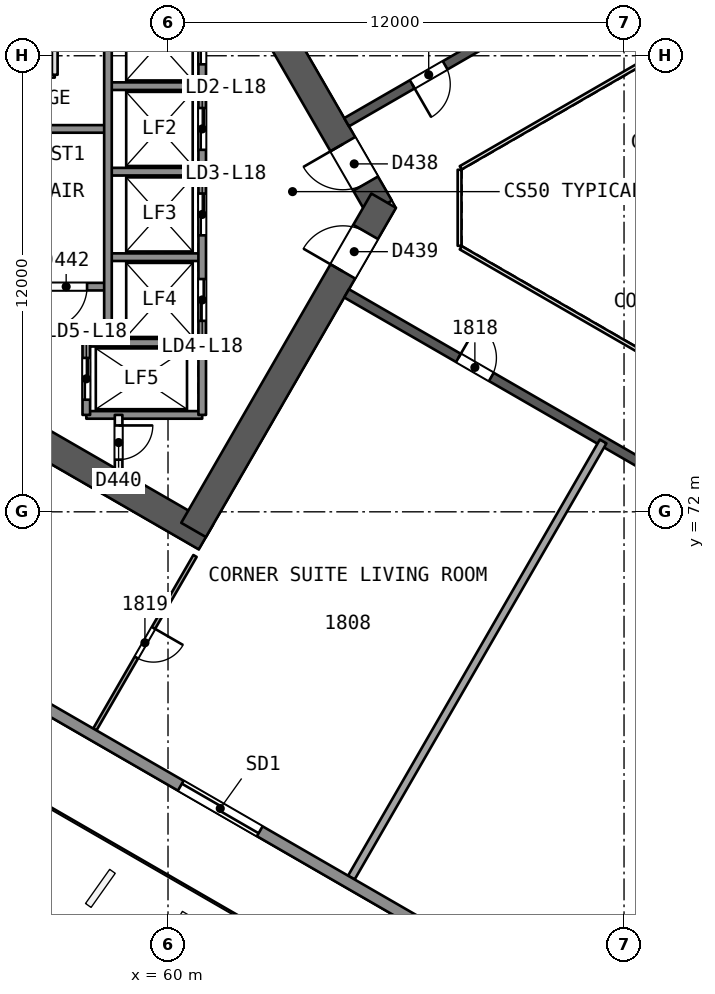
"""IFC4 building model, lengths in metres.
Left out: names, types, materials, properties, quantities, classifications, styles, units other than length and angle.
Written with IfcOpenShell. Run it as: python <this file> out.ifc"""

import sys

from ifc_helpers import new_model, si_unit, direction, frame, frame_2d, origin, place, context, subcontext, project, spatial, rectangle, extrude, element, fill, save


model = new_model("IFC4")
c1 = context("Model", 3, precision=1e-05, world=origin(), true_north=direction((0.0, 1.0)))
c2 = subcontext(c1, "Body", "Model", "MODEL_VIEW")
j1 = project(units=[si_unit("LENGTHUNIT", "METRE"), si_unit("PLANEANGLEUNIT", "RADIAN")], contexts=[c1])
p1 = place(None, origin())
s1 = spatial("IfcSite", under=j1, at=p1, CompositionType="ELEMENT")
p2 = place(p1, origin())
s2 = spatial("IfcBuilding", under=s1, at=p2, CompositionType="ELEMENT")
p3 = place(p2, frame((0.0, 0.0, 79.5)))
s3 = spatial("IfcBuildingStorey", under=s2, at=p3, CompositionType="ELEMENT", Elevation=79.5)
p4 = place(p3, frame((65.567, 80.0, 0.0), z_axis=(0.0, 0.0, 1.0), x_axis=(-0.499988615364, 0.866031976607, 0.0)))
e1 = element("IfcWall", 1, at=p4, inside=s3, PredefinedType="SHEAR", context=c2, shape_type="SweptSolid", body=[
    extrude(rectangle(XDim=10.163, YDim=0.75, at=frame_2d((5.082, 0.0))), origin(), (0.0, 0.0, 1.0), 3.7),
])
p5 = place(p4, frame((0.733, 0.0, 0.0)))
e2 = element("IfcOpeningElement", 2, at=p5, cuts=e1, PredefinedType="OPENING", context=c2, shape_type="SweptSolid", body=[
    extrude(rectangle(XDim=1.2, YDim=2.1, at=frame_2d((0.6, 1.05))), frame((0.0, 0.385, 0.0), z_axis=(0.0, -1.0, 0.0), x_axis=(1.0, 0.0, 0.0)), (0.0, 0.0, 1.0), 0.771),
])
p6 = place(p3, frame((60.673, 88.477, 0.0), z_axis=(0.0, 0.0, 1.0), x_axis=(-0.8660248072, -0.500001033313, 0.0)))
e3 = element("IfcWall", 3, at=p6, inside=s3, PredefinedType="SHEAR", context=c2, shape_type="SweptSolid", body=[
    extrude(rectangle(XDim=13.958, YDim=0.75, at=frame_2d((6.979, 0.0))), origin(), (0.0, 0.0, 1.0), 3.7),
])
p7 = place(p3, frame((48.772, 78.394, 0.0), z_axis=(0.0, 0.0, 1.0), x_axis=(0.866028339916, -0.499994914436, 0.0)))
e4 = element("IfcWall", 4, at=p7, inside=s3, PredefinedType="SHEAR", context=c2, shape_type="SweptSolid", body=[
    extrude(rectangle(XDim=14.117, YDim=0.75, at=frame_2d((7.059, 0.0))), origin(), (0.0, 0.0, 1.0), 3.7),
])
p8 = place(p3, frame((60.673, 71.523, 0.0), z_axis=(0.0, 0.0, 1.0), x_axis=(0.499997052475, 0.866027105532, 0.0)))
e5 = element("IfcWall", 5, at=p8, inside=s3, PredefinedType="SHEAR", context=c2, shape_type="SweptSolid", body=[
    extrude(rectangle(XDim=10.005, YDim=0.75, at=frame_2d((5.002, 0.0))), origin(), (0.0, 0.0, 1.0), 3.7),
])
p9 = place(p8, frame((7.855, 0.0, 0.0)))
e6 = element("IfcOpeningElement", 6, at=p9, cuts=e5, PredefinedType="OPENING", context=c2, shape_type="SweptSolid", body=[
    extrude(rectangle(XDim=1.2, YDim=2.1, at=frame_2d((0.6, 1.05))), frame((0.0, 0.385, 0.0), z_axis=(0.0, -1.0, 0.0), x_axis=(1.0, 0.0, 0.0)), (0.0, 0.0, 1.0), 0.771),
])
p10 = place(p3, frame((78.2, 90.046, 0.0), z_axis=(0.0, 0.0, 1.0), x_axis=(-0.866026492143, -0.499998114903, 0.0)))
e7 = element("IfcWall", 7, at=p10, inside=s3, PredefinedType="SHEAR", context=c2, shape_type="SweptSolid", body=[
    extrude(rectangle(XDim=15.588, YDim=0.25, at=frame_2d((7.794, 0.0))), origin(), (0.0, 0.0, 1.0), 3.2),
])
p11 = place(p10, frame((1.527, 0.0, 0.0)))
e8 = element("IfcOpeningElement", 8, at=p11, cuts=e7, PredefinedType="OPENING", context=c2, shape_type="SweptSolid", body=[
    extrude(rectangle(XDim=1.0, YDim=2.1, at=frame_2d((0.5, 1.05))), frame((0.0, 0.135, 0.0), z_axis=(0.0, -1.0, 0.0), x_axis=(1.0, 0.0, 0.0)), (0.0, 0.0, 1.0), 0.271),
])
p12 = place(p10, frame((8.227, 0.0, 0.0)))
e9 = element("IfcOpeningElement", 9, at=p12, cuts=e7, PredefinedType="OPENING", context=c2, shape_type="SweptSolid", body=[
    extrude(rectangle(XDim=1.1, YDim=2.1, at=frame_2d((0.55, 1.05))), frame((0.0, 0.135, 0.0), z_axis=(0.0, -1.0, 0.0), x_axis=(1.0, 0.0, 0.0)), (0.0, 0.0, 1.0), 0.271),
])
p13 = place(p10, frame((12.594, 0.0, 0.0)))
e10 = element("IfcOpeningElement", 10, at=p13, cuts=e7, PredefinedType="OPENING", context=c2, shape_type="SweptSolid", body=[
    extrude(rectangle(XDim=1.0, YDim=2.1, at=frame_2d((0.5, 1.05))), frame((0.0, 0.135, 0.0), z_axis=(0.0, -1.0, 0.0), x_axis=(1.0, 0.0, 0.0)), (0.0, 0.0, 1.0), 0.271),
])
p14 = place(p3, frame((64.7, 77.748, 0.0), z_axis=(0.0, 0.0, 1.0), x_axis=(0.866026492143, -0.499998114903, 0.0)))
e11 = element("IfcWall", 11, at=p14, inside=s3, PredefinedType="SHEAR", context=c2, shape_type="SweptSolid", body=[
    extrude(rectangle(XDim=15.588, YDim=0.25, at=frame_2d((7.794, 0.0))), origin(), (0.0, 0.0, 1.0), 3.2),
])
p15 = place(p14, frame((3.397, 0.0, 0.0)))
e12 = element("IfcOpeningElement", 12, at=p15, cuts=e11, PredefinedType="OPENING", context=c2, shape_type="SweptSolid", body=[
    extrude(rectangle(XDim=1.0, YDim=2.1, at=frame_2d((0.5, 1.05))), frame((0.0, 0.135, 0.0), z_axis=(0.0, -1.0, 0.0), x_axis=(1.0, 0.0, 0.0)), (0.0, 0.0, 1.0), 0.271),
])
p16 = place(p14, frame((9.091, 0.0, 0.0)))
e13 = element("IfcOpeningElement", 13, at=p16, cuts=e11, PredefinedType="OPENING", context=c2, shape_type="SweptSolid", body=[
    extrude(rectangle(XDim=1.0, YDim=2.1, at=frame_2d((0.5, 1.05))), frame((0.0, 0.135, 0.0), z_axis=(0.0, -1.0, 0.0), x_axis=(1.0, 0.0, 0.0)), (0.0, 0.0, 1.0), 0.271),
])
p17 = place(p3, frame((60.71, 70.838, 0.0), z_axis=(0.0, 0.0, 1.0), x_axis=(-0.499973627007, -0.866040629704, 0.0)))
e14 = element("IfcWall", 14, at=p17, inside=s3, PredefinedType="PARTITIONING", context=c2, shape_type="SweptSolid", body=[
    extrude(rectangle(XDim=5.273, YDim=0.1, at=frame_2d((2.636, 0.0))), origin(), (0.0, 0.0, 1.0), 3.2),
])
p18 = place(p17, frame((2.186, 0.0, 0.0)))
e15 = element("IfcOpeningElement", 15, at=p18, cuts=e14, PredefinedType="OPENING", context=c2, shape_type="SweptSolid", body=[
    extrude(rectangle(XDim=0.9, YDim=2.1, at=frame_2d((0.45, 1.05))), frame((0.0, 0.061, 0.0), z_axis=(0.0, -1.0, 0.0), x_axis=(1.0, 0.0, 0.0)), (0.0, 0.0, 1.0), 0.121),
])
p19 = place(p3, frame((64.824, 62.375, 0.0), z_axis=(0.0, 0.0, 1.0), x_axis=(0.499993034499, 0.866029425281, 0.0)))
e16 = element("IfcWall", 16, at=p19, inside=s3, PredefinedType="PARTITIONING", context=c2, shape_type="SweptSolid", body=[
    extrude(rectangle(XDim=13.252, YDim=0.2, at=frame_2d((6.626, 0.0))), origin(), (0.0, 0.0, 1.0), 3.2),
])
p20 = place(p3, frame((39.223, 83.016, 0.0), z_axis=(0.0, 0.0, 1.0), x_axis=(0.86602468924, 0.500001237625, 0.0)))
e17 = element("IfcWall", 17, at=p20, inside=s3, PredefinedType="SOLIDWALL", context=c2, shape_type="SweptSolid", body=[
    extrude(rectangle(XDim=58.951, YDim=0.3, at=frame_2d((29.476, 0.0))), origin(), (0.0, 0.0, 1.0), 3.2),
])
p21 = place(p20, frame((28.743, 0.0, 0.0)))
e18 = element("IfcOpeningElement", 18, at=p21, cuts=e17, PredefinedType="OPENING", context=c2, shape_type="SweptSolid", body=[
    extrude(rectangle(XDim=2.4, YDim=2.4, at=frame_2d((1.2, 1.2))), frame((0.0, 0.161, 0.0), z_axis=(0.0, -1.0, 0.0), x_axis=(1.0, 0.0, 0.0)), (0.0, 0.0, 1.0), 0.321),
])
p22 = place(p20, frame((34.043, 0.0, 0.0)))
e19 = element("IfcOpeningElement", 19, at=p22, cuts=e17, PredefinedType="OPENING", context=c2, shape_type="SweptSolid", body=[
    extrude(rectangle(XDim=2.4, YDim=2.4, at=frame_2d((1.2, 1.2))), frame((0.0, 0.161, 0.0), z_axis=(0.0, -1.0, 0.0), x_axis=(1.0, 0.0, 0.0)), (0.0, 0.0, 1.0), 0.321),
])
p23 = place(p20, frame((45.739, 0.0, 0.0)))
e20 = element("IfcOpeningElement", 20, at=p23, cuts=e17, PredefinedType="OPENING", context=c2, shape_type="SweptSolid", body=[
    extrude(rectangle(XDim=2.4, YDim=2.4, at=frame_2d((1.2, 1.2))), frame((0.0, 0.161, 0.0), z_axis=(0.0, -1.0, 0.0), x_axis=(1.0, 0.0, 0.0)), (0.0, 0.0, 1.0), 0.321),
])
p24 = place(p20, frame((22.976, 0.0, 0.0)))
e21 = element("IfcOpeningElement", 21, at=p24, cuts=e17, PredefinedType="OPENING", context=c2, shape_type="SweptSolid", body=[
    extrude(rectangle(XDim=2.4, YDim=2.4, at=frame_2d((1.2, 1.2))), frame((0.0, 0.161, 0.0), z_axis=(0.0, -1.0, 0.0), x_axis=(1.0, 0.0, 0.0)), (0.0, 0.0, 1.0), 0.321),
])
p25 = place(p20, frame((10.773, 0.0, 0.0)))
e22 = element("IfcOpeningElement", 22, at=p25, cuts=e17, PredefinedType="OPENING", context=c2, shape_type="SweptSolid", body=[
    extrude(rectangle(XDim=2.4, YDim=2.4, at=frame_2d((1.2, 1.2))), frame((0.0, 0.161, 0.0), z_axis=(0.0, -1.0, 0.0), x_axis=(1.0, 0.0, 0.0)), (0.0, 0.0, 1.0), 0.321),
])
p26 = place(p3, frame((90.276, 47.508, 0.0), z_axis=(0.0, 0.0, 1.0), x_axis=(-0.86602468924, 0.500001237625, 0.0)))
e23 = element("IfcWall", 23, at=p26, inside=s3, PredefinedType="SOLIDWALL", context=c2, shape_type="SweptSolid", body=[
    extrude(rectangle(XDim=58.951, YDim=0.3, at=frame_2d((29.476, 0.0))), origin(), (0.0, 0.0, 1.0), 3.2),
])
p27 = place(p26, frame((32.173, 0.0, 0.0)))
e24 = element("IfcOpeningElement", 24, at=p27, cuts=e23, PredefinedType="OPENING", context=c2, shape_type="SweptSolid", body=[
    extrude(rectangle(XDim=2.4, YDim=2.4, at=frame_2d((1.2, 1.2))), frame((0.0, 0.161, 0.0), z_axis=(0.0, -1.0, 0.0), x_axis=(1.0, 0.0, 0.0)), (0.0, 0.0, 1.0), 0.321),
])
p28 = place(p26, frame((45.739, 0.0, 0.0)))
e25 = element("IfcOpeningElement", 25, at=p28, cuts=e23, PredefinedType="OPENING", context=c2, shape_type="SweptSolid", body=[
    extrude(rectangle(XDim=2.4, YDim=2.4, at=frame_2d((1.2, 1.2))), frame((0.0, 0.161, 0.0), z_axis=(0.0, -1.0, 0.0), x_axis=(1.0, 0.0, 0.0)), (0.0, 0.0, 1.0), 0.321),
])
p29 = place(p26, frame((13.495, 0.0, 0.0)))
e26 = element("IfcOpeningElement", 26, at=p29, cuts=e23, PredefinedType="OPENING", context=c2, shape_type="SweptSolid", body=[
    extrude(rectangle(XDim=2.4, YDim=2.4, at=frame_2d((1.2, 1.2))), frame((0.0, 0.161, 0.0), z_axis=(0.0, -1.0, 0.0), x_axis=(1.0, 0.0, 0.0)), (0.0, 0.0, 1.0), 0.321),
])
p30 = place(p3, frame((57.02, 83.5, 0.0), z_axis=(0.0, 0.0, 1.0), x_axis=(-1.0, 0.0, 0.0)))
e27 = element("IfcWall", 27, at=p30, inside=s3, PredefinedType="PARTITIONING", context=c2, shape_type="SweptSolid", body=[
    extrude(rectangle(XDim=4.218, YDim=0.15, at=frame_2d((2.109, 0.0))), origin(), (0.0, 0.0, 1.0), 3.2),
])
p31 = place(p30, frame((1.631, 0.0, 0.0)))
e28 = element("IfcOpeningElement", 28, at=p31, cuts=e27, PredefinedType="OPENING", context=c2, shape_type="SweptSolid", body=[
    extrude(rectangle(XDim=0.9, YDim=2.1, at=frame_2d((0.45, 1.05))), frame((0.0, 0.085, 0.0), z_axis=(0.0, -1.0, 0.0), x_axis=(1.0, 0.0, 0.0)), (0.0, 0.0, 1.0), 0.171),
])
p32 = place(p3, frame((60.9, 83.2, 0.0), z_axis=(0.0, 0.0, 1.0), x_axis=(-1.0, 0.0, 0.0)))
e29 = element("IfcWall", 29, at=p32, inside=s3, PredefinedType="SOLIDWALL", context=c2, shape_type="SweptSolid", body=[
    extrude(rectangle(XDim=2.48, YDim=0.2, at=frame_2d((1.24, 0.0))), origin(), (0.0, 0.0, 1.0), 3.2),
])
p33 = place(p3, frame((58.42, 82.075, 0.0), z_axis=(0.0, 0.0, 1.0), x_axis=(-1.0, 0.0, 0.0)))
e30 = element("IfcWall", 30, at=p33, inside=s3, PredefinedType="SOLIDWALL", context=c2, shape_type="SweptSolid", body=[
    extrude(rectangle(XDim=7.7, YDim=0.2, at=frame_2d((3.85, 0.0))), origin(), (0.0, 0.0, 1.0), 3.2),
])
for number, where, z_axis, x_axis in (
    (31, (60.9, 80.95, 0.0), (0.0, 0.0, 1.0), (-1.0, 0.0, 0.0)),
    (32, (60.9, 78.7, 0.0), (0.0, 0.0, 1.0), (-1.0, 0.0, 0.0)),
):
    element("IfcWall", number, at=place(p3, frame(where, z_axis=z_axis, x_axis=x_axis)), inside=s3, PredefinedType="SOLIDWALL", context=c2, shape_type="SweptSolid", body=[
        extrude(rectangle(XDim=2.48, YDim=0.2, at=frame_2d((1.24, 0.0))), origin(), (0.0, 0.0, 1.0), 3.2),
    ])
p34 = place(p3, frame((58.42, 77.925, 0.0), z_axis=(0.0, 0.0, 1.0), x_axis=(-1.0, 0.0, 0.0)))
e33 = element("IfcWall", 33, at=p34, inside=s3, PredefinedType="SOLIDWALL", context=c2, shape_type="SweptSolid", body=[
    extrude(rectangle(XDim=7.7, YDim=0.2, at=frame_2d((3.85, 0.0))), origin(), (0.0, 0.0, 1.0), 3.2),
])
p35 = place(p34, frame((0.55, 0.0, 0.0)))
e34 = element("IfcOpeningElement", 34, at=p35, cuts=e33, PredefinedType="OPENING", context=c2, shape_type="SweptSolid", body=[
    extrude(rectangle(XDim=1.1, YDim=2.1, at=frame_2d((0.55, 1.05))), frame((0.0, 0.11, 0.0), z_axis=(0.0, -1.0, 0.0), x_axis=(1.0, 0.0, 0.0)), (0.0, 0.0, 1.0), 0.221),
])
for number, where, z_axis, x_axis in (
    (35, (60.9, 76.45, 0.0), (0.0, 0.0, 1.0), (-1.0, 0.0, 0.0)),
    (36, (60.9, 74.55, 0.0), (0.0, 0.0, 1.0), (-1.0, 0.0, 0.0)),
):
    element("IfcWall", number, at=place(p3, frame(where, z_axis=z_axis, x_axis=x_axis)), inside=s3, PredefinedType="SOLIDWALL", context=c2, shape_type="SweptSolid", body=[
        extrude(rectangle(XDim=3.05, YDim=0.2, at=frame_2d((1.525, 0.0))), origin(), (0.0, 0.0, 1.0), 3.2),
    ])
p36 = place(p3, frame((60.9, 85.45, 0.0), z_axis=(0.0, 0.0, 1.0), x_axis=(0.0, -1.0, 0.0)))
e37 = element("IfcWall", 37, at=p36, inside=s3, PredefinedType="SOLIDWALL", context=c2, shape_type="SweptSolid", body=[
    extrude(rectangle(XDim=10.9, YDim=0.2, at=frame_2d((5.45, 0.0))), origin(), (0.0, 0.0, 1.0), 3.2),
])
p37 = place(p36, frame((0.575, 0.0, 0.0)))
e38 = element("IfcOpeningElement", 38, at=p37, cuts=e37, PredefinedType="OPENING", context=c2, shape_type="SweptSolid", body=[
    extrude(rectangle(XDim=1.1, YDim=2.1, at=frame_2d((0.55, 1.05))), frame((0.0, 0.11, 0.0), z_axis=(0.0, -1.0, 0.0), x_axis=(1.0, 0.0, 0.0)), (0.0, 0.0, 1.0), 0.221),
])
p38 = place(p36, frame((2.825, 0.0, 0.0)))
e39 = element("IfcOpeningElement", 39, at=p38, cuts=e37, PredefinedType="OPENING", context=c2, shape_type="SweptSolid", body=[
    extrude(rectangle(XDim=1.1, YDim=2.1, at=frame_2d((0.55, 1.05))), frame((0.0, 0.11, 0.0), z_axis=(0.0, -1.0, 0.0), x_axis=(1.0, 0.0, 0.0)), (0.0, 0.0, 1.0), 0.221),
])
p39 = place(p36, frame((5.075, 0.0, 0.0)))
e40 = element("IfcOpeningElement", 40, at=p39, cuts=e37, PredefinedType="OPENING", context=c2, shape_type="SweptSolid", body=[
    extrude(rectangle(XDim=1.1, YDim=2.1, at=frame_2d((0.55, 1.05))), frame((0.0, 0.11, 0.0), z_axis=(0.0, -1.0, 0.0), x_axis=(1.0, 0.0, 0.0)), (0.0, 0.0, 1.0), 0.221),
])
p40 = place(p36, frame((7.325, 0.0, 0.0)))
e41 = element("IfcOpeningElement", 41, at=p40, cuts=e37, PredefinedType="OPENING", context=c2, shape_type="SweptSolid", body=[
    extrude(rectangle(XDim=1.1, YDim=2.1, at=frame_2d((0.55, 1.05))), frame((0.0, 0.11, 0.0), z_axis=(0.0, -1.0, 0.0), x_axis=(1.0, 0.0, 0.0)), (0.0, 0.0, 1.0), 0.221),
])
p41 = place(p3, frame((58.7, 74.55, 0.0), z_axis=(0.0, 0.0, 1.0), x_axis=(0.0, -1.0, 0.0)))
e42 = element("IfcWall", 42, at=p41, inside=s3, PredefinedType="PARTITIONING", context=c2, shape_type="SweptSolid", body=[
    extrude(rectangle(XDim=1.455, YDim=0.2, at=frame_2d((0.728, 0.0))), origin(), (0.0, 0.0, 1.0), 3.2),
])
p42 = place(p41, frame((0.278, 0.0, 0.0)))
e43 = element("IfcOpeningElement", 43, at=p42, cuts=e42, PredefinedType="OPENING", context=c2, shape_type="SweptSolid", body=[
    extrude(rectangle(XDim=0.9, YDim=2.1, at=frame_2d((0.45, 1.05))), frame((0.0, 0.11, 0.0), z_axis=(0.0, -1.0, 0.0), x_axis=(1.0, 0.0, 0.0)), (0.0, 0.0, 1.0), 0.221),
])
p43 = place(p3, frame((58.42, 85.45, 0.0), z_axis=(0.0, 0.0, 1.0), x_axis=(0.0, -1.0, 0.0)))
e44 = element("IfcWall", 44, at=p43, inside=s3, PredefinedType="SOLIDWALL", context=c2, shape_type="SweptSolid", body=[
    extrude(rectangle(XDim=9.0, YDim=0.2, at=frame_2d((4.5, 0.0))), origin(), (0.0, 0.0, 1.0), 3.2),
])
p44 = place(p3, frame((57.85, 76.45, 0.0), z_axis=(0.0, 0.0, 1.0), x_axis=(0.0, -1.0, 0.0)))
e45 = element("IfcWall", 45, at=p44, inside=s3, PredefinedType="SOLIDWALL", context=c2, shape_type="SweptSolid", body=[
    extrude(rectangle(XDim=1.9, YDim=0.2, at=frame_2d((0.95, 0.0))), origin(), (0.0, 0.0, 1.0), 3.2),
])
p45 = place(p44, frame((0.4, 0.0, 0.0)))
e46 = element("IfcOpeningElement", 46, at=p45, cuts=e45, PredefinedType="OPENING", context=c2, shape_type="SweptSolid", body=[
    extrude(rectangle(XDim=1.1, YDim=2.1, at=frame_2d((0.55, 1.05))), frame((0.0, 0.11, 0.0), z_axis=(0.0, -1.0, 0.0), x_axis=(1.0, 0.0, 0.0)), (0.0, 0.0, 1.0), 0.221),
])
p46 = place(p3, frame((57.02, 85.935, 0.0), z_axis=(0.0, 0.0, 1.0), x_axis=(0.0, -1.0, 0.0)))
e47 = element("IfcWall", 47, at=p46, inside=s3, PredefinedType="PARTITIONING", context=c2, shape_type="SweptSolid", body=[
    extrude(rectangle(XDim=2.435, YDim=0.15, at=frame_2d((1.218, 0.0))), origin(), (0.0, 0.0, 1.0), 3.2),
])
p47 = place(p3, frame((77.738, 86.846, 0.0), z_axis=(0.0, 0.0, 1.0), x_axis=(-0.866026658274, -0.499997827154, 0.0)))
e48 = element("IfcWall", 48, at=p47, inside=s3, PredefinedType="PARTITIONING", context=c2, shape_type="SweptSolid", body=[
    extrude(rectangle(XDim=11.588, YDim=0.1, at=frame_2d((5.794, 0.0))), origin(), (0.0, 0.0, 1.0), 3.2),
])
p48 = place(p3, frame((67.672, 81.0, 0.0), z_axis=(0.0, 0.0, 1.0), x_axis=(0.0, -1.0, 0.0)))
e49 = element("IfcWall", 49, at=p48, inside=s3, PredefinedType="PARTITIONING", context=c2, shape_type="SweptSolid", body=[
    extrude(rectangle(XDim=2.0, YDim=0.1, at=frame_2d((1.0, 0.0))), origin(), (0.0, 0.0, 1.0), 3.2),
])
p49 = place(p3, frame((67.702, 78.948, 0.0), z_axis=(0.0, 0.0, 1.0), x_axis=(0.866026658274, -0.499997827154, 0.0)))
e50 = element("IfcWall", 50, at=p49, inside=s3, PredefinedType="PARTITIONING", context=c2, shape_type="SweptSolid", body=[
    extrude(rectangle(XDim=11.588, YDim=0.1, at=frame_2d((5.794, 0.0))), origin(), (0.0, 0.0, 1.0), 3.2),
])
p50 = place(p13, origin())
e51 = element("IfcDoor", 51, at=p50, inside=s3, OperationType="SINGLE_SWING_RIGHT", PredefinedType="NOTDEFINED", context=c2, shape_type="SweptSolid", body=[
    extrude(rectangle(XDim=1.0, YDim=2.1, at=frame_2d((0.5, 1.05))), frame((0.0, 0.025, 0.0), z_axis=(0.0, -1.0, 0.0), x_axis=(1.0, 0.0, 0.0)), (0.0, 0.0, 1.0), 0.05),
])
fill(e10, e51)
p51 = place(p15, origin())
e52 = element("IfcDoor", 52, at=p51, inside=s3, OperationType="SINGLE_SWING_LEFT", PredefinedType="NOTDEFINED", context=c2, shape_type="SweptSolid", body=[
    extrude(rectangle(XDim=1.0, YDim=2.1, at=frame_2d((0.5, 1.05))), frame((0.0, 0.025, 0.0), z_axis=(0.0, -1.0, 0.0), x_axis=(1.0, 0.0, 0.0)), (0.0, 0.0, 1.0), 0.05),
])
fill(e12, e52)
p52 = place(p18, origin())
e53 = element("IfcDoor", 53, at=p52, inside=s3, OperationType="SINGLE_SWING_LEFT", PredefinedType="NOTDEFINED", context=c2, shape_type="SweptSolid", body=[
    extrude(rectangle(XDim=0.9, YDim=2.1, at=frame_2d((0.45, 1.05))), frame((0.0, 0.025, 0.0), z_axis=(0.0, -1.0, 0.0), x_axis=(1.0, 0.0, 0.0)), (0.0, 0.0, 1.0), 0.05),
])
fill(e15, e53)
p53 = place(p27, origin())
e54 = element("IfcDoor", 54, at=p53, inside=s3, OperationType="SLIDING_TO_LEFT", PredefinedType="NOTDEFINED", context=c2, shape_type="SweptSolid", body=[
    extrude(rectangle(XDim=2.4, YDim=2.4, at=frame_2d((1.2, 1.2))), frame((0.0, 0.025, 0.0), z_axis=(0.0, -1.0, 0.0), x_axis=(1.0, 0.0, 0.0)), (0.0, 0.0, 1.0), 0.05),
])
fill(e24, e54)
p54 = place(p5, origin())
e55 = element("IfcDoor", 55, at=p54, inside=s3, OperationType="SINGLE_SWING_RIGHT", PredefinedType="NOTDEFINED", context=c2, shape_type="SweptSolid", body=[
    extrude(rectangle(XDim=1.2, YDim=2.1, at=frame_2d((0.6, 1.05))), frame((0.0, 0.025, 0.0), z_axis=(0.0, -1.0, 0.0), x_axis=(1.0, 0.0, 0.0)), (0.0, 0.0, 1.0), 0.05),
])
fill(e2, e55)
p55 = place(p9, origin())
e56 = element("IfcDoor", 56, at=p55, inside=s3, OperationType="SINGLE_SWING_LEFT", PredefinedType="NOTDEFINED", context=c2, shape_type="SweptSolid", body=[
    extrude(rectangle(XDim=1.2, YDim=2.1, at=frame_2d((0.6, 1.05))), frame((0.0, 0.025, 0.0), z_axis=(0.0, -1.0, 0.0), x_axis=(1.0, 0.0, 0.0)), (0.0, 0.0, 1.0), 0.05),
])
fill(e6, e56)
p56 = place(p37, origin())
e57 = element("IfcDoor", 57, at=p56, inside=s3, OperationType="SLIDING_TO_RIGHT", PredefinedType="NOTDEFINED", context=c2, shape_type="SweptSolid", body=[
    extrude(rectangle(XDim=1.1, YDim=2.1, at=frame_2d((0.55, 1.05))), frame((0.0, 0.025, 0.0), z_axis=(0.0, -1.0, 0.0), x_axis=(1.0, 0.0, 0.0)), (0.0, 0.0, 1.0), 0.05),
])
fill(e38, e57)
p57 = place(p38, origin())
e58 = element("IfcDoor", 58, at=p57, inside=s3, OperationType="SLIDING_TO_LEFT", PredefinedType="NOTDEFINED", context=c2, shape_type="SweptSolid", body=[
    extrude(rectangle(XDim=1.1, YDim=2.1, at=frame_2d((0.55, 1.05))), frame((0.0, 0.025, 0.0), z_axis=(0.0, -1.0, 0.0), x_axis=(1.0, 0.0, 0.0)), (0.0, 0.0, 1.0), 0.05),
])
fill(e39, e58)
p58 = place(p39, origin())
e59 = element("IfcDoor", 59, at=p58, inside=s3, OperationType="SLIDING_TO_RIGHT", PredefinedType="NOTDEFINED", context=c2, shape_type="SweptSolid", body=[
    extrude(rectangle(XDim=1.1, YDim=2.1, at=frame_2d((0.55, 1.05))), frame((0.0, 0.025, 0.0), z_axis=(0.0, -1.0, 0.0), x_axis=(1.0, 0.0, 0.0)), (0.0, 0.0, 1.0), 0.05),
])
fill(e40, e59)
p59 = place(p40, origin())
e60 = element("IfcDoor", 60, at=p59, inside=s3, OperationType="SLIDING_TO_LEFT", PredefinedType="NOTDEFINED", context=c2, shape_type="SweptSolid", body=[
    extrude(rectangle(XDim=1.1, YDim=2.1, at=frame_2d((0.55, 1.05))), frame((0.0, 0.025, 0.0), z_axis=(0.0, -1.0, 0.0), x_axis=(1.0, 0.0, 0.0)), (0.0, 0.0, 1.0), 0.05),
])
fill(e41, e60)
p60 = place(p45, origin())
e61 = element("IfcDoor", 61, at=p60, inside=s3, OperationType="SLIDING_TO_RIGHT", PredefinedType="NOTDEFINED", context=c2, shape_type="SweptSolid", body=[
    extrude(rectangle(XDim=1.1, YDim=2.1, at=frame_2d((0.55, 1.05))), frame((0.0, 0.025, 0.0), z_axis=(0.0, -1.0, 0.0), x_axis=(1.0, 0.0, 0.0)), (0.0, 0.0, 1.0), 0.05),
])
fill(e46, e61)
p61 = place(p42, origin())
e62 = element("IfcDoor", 62, at=p61, inside=s3, OperationType="SINGLE_SWING_LEFT", PredefinedType="NOTDEFINED", context=c2, shape_type="SweptSolid", body=[
    extrude(rectangle(XDim=0.9, YDim=2.1, at=frame_2d((0.45, 1.05))), frame((0.0, 0.025, 0.0), z_axis=(0.0, -1.0, 0.0), x_axis=(1.0, 0.0, 0.0)), (0.0, 0.0, 1.0), 0.05),
])
fill(e43, e62)
p62 = place(p35, origin())
e63 = element("IfcDoor", 63, at=p62, inside=s3, OperationType="SINGLE_SWING_RIGHT", PredefinedType="NOTDEFINED", context=c2, shape_type="SweptSolid", body=[
    extrude(rectangle(XDim=1.1, YDim=2.1, at=frame_2d((0.55, 1.05))), frame((0.0, 0.025, 0.0), z_axis=(0.0, -1.0, 0.0), x_axis=(1.0, 0.0, 0.0)), (0.0, 0.0, 1.0), 0.05),
])
fill(e34, e63)
save(model, sys.argv[1])
